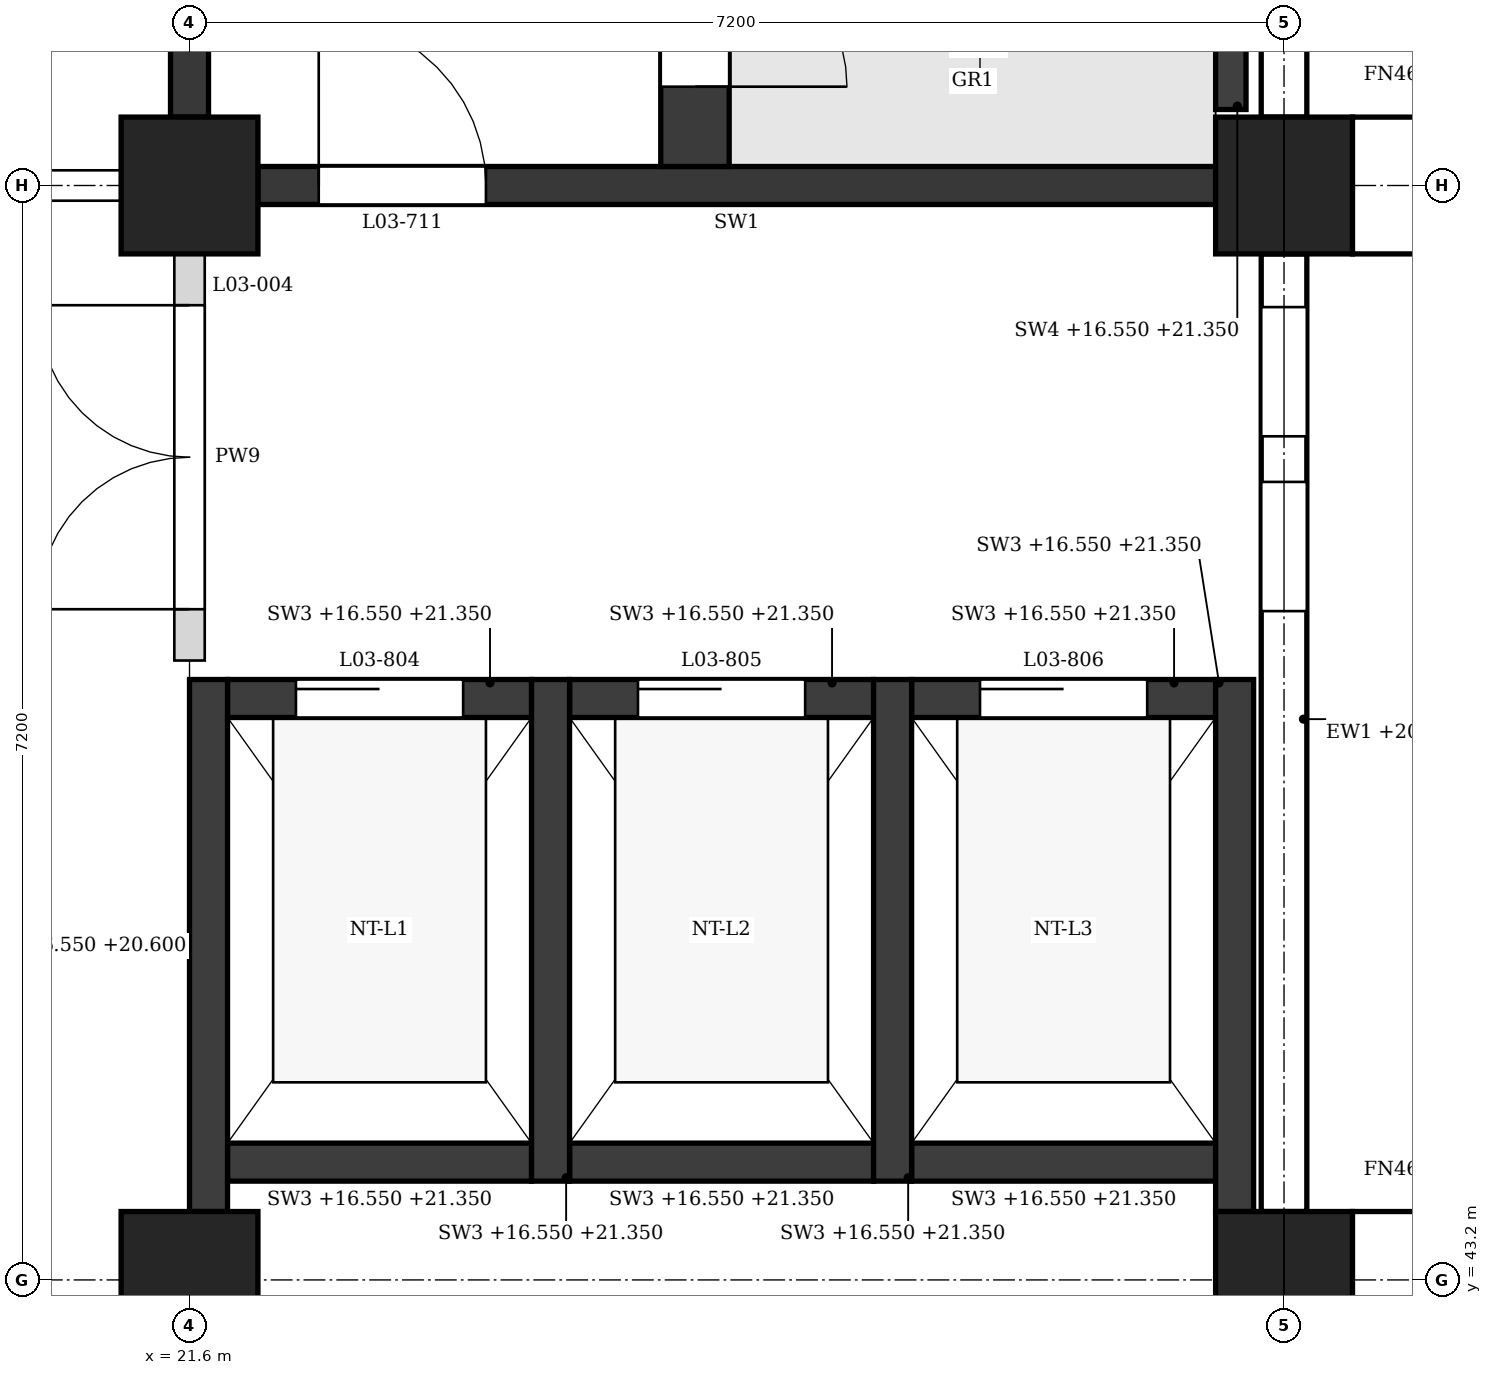
"""IFC4 building model, lengths in metres.
Left out: names, types, materials, properties, quantities, classifications, styles, units other than length and angle.
Written with IfcOpenShell. Run it as: python <this file> out.ifc"""

import sys

from ifc_helpers import new_model, si_unit, direction, frame, frame_2d, origin, origin_2d, place, context, subcontext, project, spatial, polyline, rectangle, outline, extrude, element, fill, save


model = new_model("IFC4")
c1 = context("Model", 3, precision=1e-05, world=origin(), true_north=direction((0.0, 1.0)))
c2 = subcontext(c1, "Body", "Model", "MODEL_VIEW")
j1 = project(units=[si_unit("LENGTHUNIT", "METRE"), si_unit("PLANEANGLEUNIT", "RADIAN")], contexts=[c1])
p1 = place(None, origin())
s1 = spatial("IfcSite", under=j1, at=p1, CompositionType="ELEMENT")
p2 = place(p1, origin())
s2 = spatial("IfcBuilding", under=s1, at=p2, CompositionType="ELEMENT")
p3 = place(p2, frame((0.0, 0.0, 16.8)))
s3 = spatial("IfcBuildingStorey", under=s2, at=p3, CompositionType="ELEMENT", Elevation=16.8)
for number, where, z_axis, x_axis in (
    (1, (21.6, 43.2, 0.0), (0.0, 0.0, 1.0), (1.0, 0.0, 0.0)),
    (2, (21.6, 50.4, 0.0), (0.0, 0.0, 1.0), (1.0, 0.0, 0.0)),
    (3, (28.8, 43.2, 0.0), (0.0, 0.0, 1.0), (1.0, 0.0, 0.0)),
    (4, (28.8, 50.4, 0.0), (0.0, 0.0, 1.0), (1.0, 0.0, 0.0)),
):
    element("IfcColumn", number, at=place(p3, frame(where, z_axis=z_axis, x_axis=x_axis)), inside=s3, PredefinedType="COLUMN", context=c2, shape_type="SweptSolid", body=[
        extrude(rectangle(XDim=0.9, YDim=0.9, at=origin_2d()), origin(), (0.0, 0.0, 1.0), 4.8),
    ])
p4 = place(p3, frame((28.8, 43.65, 0.0), z_axis=(0.0, 0.0, 1.0), x_axis=(0.0, 1.0, 0.0)))
e5 = element("IfcWall", 5, at=p4, inside=s3, PredefinedType="STANDARD", context=c2, shape_type="SweptSolid", body=[
    extrude(rectangle(XDim=6.3, YDim=0.3, at=frame_2d((3.15, 0.0))), origin(), (0.0, 0.0, 1.0), 3.95),
])
p5 = place(p4, frame((3.95, 0.0, 0.9)))
e6 = element("IfcOpeningElement", 6, at=p5, cuts=e5, PredefinedType="OPENING", context=c2, shape_type="SweptSolid", body=[
    extrude(outline(polyline([(0.0, 0.0), (0.85, 0.0), (0.85, 2.05), (0.425, 2.5), (0.0, 2.05), (0.0, 0.0)])), frame((0.0, 0.16, 0.0), z_axis=(0.0, -1.0, 0.0), x_axis=(1.0, 0.0, 0.0)), (0.0, 0.0, 1.0), 0.32),
])
p6 = place(p4, frame((5.1, 0.0, 0.9)))
e7 = element("IfcOpeningElement", 7, at=p6, cuts=e5, PredefinedType="OPENING", context=c2, shape_type="SweptSolid", body=[
    extrude(outline(polyline([(0.0, 0.0), (0.85, 0.0), (0.85, 2.05), (0.425, 2.5), (0.0, 2.05), (0.0, 0.0)])), frame((0.0, 0.16, 0.0), z_axis=(0.0, -1.0, 0.0), x_axis=(1.0, 0.0, 0.0)), (0.0, 0.0, 1.0), 0.32),
])
p7 = place(p3, frame((28.8, 50.85, 0.0), z_axis=(0.0, 0.0, 1.0), x_axis=(0.0, 1.0, 0.0)))
e8 = element("IfcWall", 8, at=p7, inside=s3, PredefinedType="STANDARD", context=c2, shape_type="SweptSolid", body=[
    extrude(rectangle(XDim=6.3, YDim=0.3, at=frame_2d((3.15, 0.0))), origin(), (0.0, 0.0, 1.0), 3.95),
])
p8 = place(p7, frame((0.9, 0.0, 0.9)))
e9 = element("IfcOpeningElement", 9, at=p8, cuts=e8, PredefinedType="OPENING", context=c2, shape_type="SweptSolid", body=[
    extrude(outline(polyline([(0.0, 0.0), (0.9, 0.0), (0.9, 2.05), (0.45, 2.5), (0.0, 2.05), (0.0, 0.0)])), frame((0.0, 0.16, 0.0), z_axis=(0.0, -1.0, 0.0), x_axis=(1.0, 0.0, 0.0)), (0.0, 0.0, 1.0), 0.32),
])
p9 = place(p7, frame((4.5, 0.0, 0.9)))
e10 = element("IfcOpeningElement", 10, at=p9, cuts=e8, PredefinedType="OPENING", context=c2, shape_type="SweptSolid", body=[
    extrude(outline(polyline([(0.0, 0.0), (0.9, 0.0), (0.9, 2.05), (0.45, 2.5), (0.0, 2.05), (0.0, 0.0)])), frame((0.0, 0.16, 0.0), z_axis=(0.0, -1.0, 0.0), x_axis=(1.0, 0.0, 0.0)), (0.0, 0.0, 1.0), 0.32),
])
for number, where, z_axis, x_axis in (
    (11, (29.25, 43.2, 0.0), (0.0, 0.0, 1.0), (1.0, 0.0, 0.0)),
    (12, (29.25, 50.4, 0.0), (0.0, 0.0, 1.0), (1.0, 0.0, 0.0)),
):
    element("IfcWall", number, at=place(p3, frame(where, z_axis=z_axis, x_axis=x_axis)), inside=s3, PredefinedType="POLYGONAL", context=c2, shape_type="SweptSolid", body=[
        extrude(outline(polyline([(1.1, 0.0), (1.1, 4.55), (0.0, 4.55), (0.0, 0.0), (1.1, 0.0)])), frame((0.0, 0.45, 0.0), z_axis=(0.0, -1.0, 0.0), x_axis=(1.0, 0.0, 0.0)), (0.0, 0.0, 1.0), 0.9),
    ])
p10 = place(p3, frame((22.05, 50.4, 0.0), z_axis=(0.0, 0.0, 1.0), x_axis=(1.0, 0.0, 0.0)))
e13 = element("IfcWall", 13, at=p10, inside=s3, PredefinedType="SHEAR", context=c2, shape_type="SweptSolid", body=[
    extrude(rectangle(XDim=6.3, YDim=0.25, at=frame_2d((3.15, 0.0))), origin(), (0.0, 0.0, 1.0), 3.8),
])
p11 = place(p10, frame((0.4, 0.0, 0.0)))
e14 = element("IfcOpeningElement", 14, at=p11, cuts=e13, PredefinedType="OPENING", context=c2, shape_type="SweptSolid", body=[
    extrude(rectangle(XDim=1.1, YDim=2.1, at=frame_2d((0.55, 1.05))), frame((0.0, 0.135, 0.0), z_axis=(0.0, -1.0, 0.0), x_axis=(1.0, 0.0, 0.0)), (0.0, 0.0, 1.0), 0.27),
])
p12 = place(p3, frame((21.6, 50.85, 0.0), z_axis=(0.0, 0.0, 1.0), x_axis=(0.0, 1.0, 0.0)))
e15 = element("IfcWall", 15, at=p12, inside=s3, PredefinedType="SHEAR", context=c2, shape_type="SweptSolid", body=[
    extrude(rectangle(XDim=6.3, YDim=0.25, at=frame_2d((3.15, 0.0))), origin(), (0.0, 0.0, 1.0), 3.8),
])
p13 = place(p3, frame((28.45, 50.9, -0.25), z_axis=(0.0, 0.0, 1.0), x_axis=(0.0, 1.0, 0.0)))
e16 = element("IfcWall", 16, at=p13, inside=s3, PredefinedType="SHEAR", context=c2, shape_type="SweptSolid", body=[
    extrude(rectangle(XDim=0.85, YDim=0.2, at=frame_2d((0.425, 0.0))), origin(), (0.0, 0.0, 1.0), 4.8),
])
p14 = place(p3, frame((24.925, 50.525, 0.0), z_axis=(0.0, 0.0, 1.0), x_axis=(0.0, 1.0, 0.0)))
e17 = element("IfcWall", 17, at=p14, inside=s3, PredefinedType="SHEAR", context=c2, shape_type="SweptSolid", body=[
    extrude(rectangle(XDim=6.85, YDim=0.45, at=frame_2d((3.425, 0.0))), origin(), (0.0, 0.0, 1.0), 4.55),
])
p15 = place(p14, frame((0.525, 0.0, 0.0)))
e18 = element("IfcOpeningElement", 18, at=p15, cuts=e17, PredefinedType="OPENING", context=c2, shape_type="SweptSolid", body=[
    extrude(rectangle(XDim=1.0, YDim=2.1, at=frame_2d((0.5, 1.05))), frame((0.0, 0.235, 0.0), z_axis=(0.0, -1.0, 0.0), x_axis=(1.0, 0.0, 0.0)), (0.0, 0.0, 1.0), 0.47),
])
p16 = place(p3, frame((21.725, 43.65, -0.25), z_axis=(0.0, 0.0, 1.0), x_axis=(0.0, 1.0, 0.0)))
e19 = element("IfcWall", 19, at=p16, inside=s3, PredefinedType="SHEAR", context=c2, shape_type="SweptSolid", body=[
    extrude(rectangle(XDim=3.5, YDim=0.25, at=frame_2d((1.75, 0.0))), origin(), (0.0, 0.0, 1.0), 4.05),
])
for number, where, z_axis, x_axis in (
    (20, (23.975, 43.85, -0.25), (0.0, 0.0, 1.0), (0.0, 1.0, 0.0)),
    (21, (26.225, 43.85, -0.25), (0.0, 0.0, 1.0), (0.0, 1.0, 0.0)),
):
    element("IfcWall", number, at=place(p3, frame(where, z_axis=z_axis, x_axis=x_axis)), inside=s3, PredefinedType="SHEAR", context=c2, shape_type="SweptSolid", body=[
        extrude(rectangle(XDim=3.3, YDim=0.25, at=frame_2d((1.65, 0.0))), origin(), (0.0, 0.0, 1.0), 4.8),
    ])
p17 = place(p3, frame((28.475, 43.65, -0.25), z_axis=(0.0, 0.0, 1.0), x_axis=(0.0, 1.0, 0.0)))
e22 = element("IfcWall", 22, at=p17, inside=s3, PredefinedType="SHEAR", context=c2, shape_type="SweptSolid", body=[
    extrude(rectangle(XDim=3.5, YDim=0.25, at=frame_2d((1.75, 0.0))), origin(), (0.0, 0.0, 1.0), 4.8),
])
p18 = place(p3, frame((21.85, 47.025, -0.25), z_axis=(0.0, 0.0, 1.0), x_axis=(1.0, 0.0, 0.0)))
e23 = element("IfcWall", 23, at=p18, inside=s3, PredefinedType="SHEAR", context=c2, shape_type="SweptSolid", body=[
    extrude(rectangle(XDim=2.0, YDim=0.25, at=frame_2d((1.0, 0.0))), origin(), (0.0, 0.0, 1.0), 4.8),
])
p19 = place(p18, frame((0.45, 0.0, 0.25)))
e24 = element("IfcOpeningElement", 24, at=p19, cuts=e23, PredefinedType="OPENING", context=c2, shape_type="SweptSolid", body=[
    extrude(rectangle(XDim=1.1, YDim=2.1, at=frame_2d((0.55, 1.05))), frame((0.0, 0.135, 0.0), z_axis=(0.0, -1.0, 0.0), x_axis=(1.0, 0.0, 0.0)), (0.0, 0.0, 1.0), 0.27),
])
p20 = place(p3, frame((21.85, 43.975, -0.25), z_axis=(0.0, 0.0, 1.0), x_axis=(1.0, 0.0, 0.0)))
e25 = element("IfcWall", 25, at=p20, inside=s3, PredefinedType="SHEAR", context=c2, shape_type="SweptSolid", body=[
    extrude(rectangle(XDim=2.0, YDim=0.25, at=frame_2d((1.0, 0.0))), origin(), (0.0, 0.0, 1.0), 4.8),
])
p21 = place(p3, frame((24.1, 47.025, -0.25), z_axis=(0.0, 0.0, 1.0), x_axis=(1.0, 0.0, 0.0)))
e26 = element("IfcWall", 26, at=p21, inside=s3, PredefinedType="SHEAR", context=c2, shape_type="SweptSolid", body=[
    extrude(rectangle(XDim=2.0, YDim=0.25, at=frame_2d((1.0, 0.0))), origin(), (0.0, 0.0, 1.0), 4.8),
])
p22 = place(p21, frame((0.45, 0.0, 0.25)))
e27 = element("IfcOpeningElement", 27, at=p22, cuts=e26, PredefinedType="OPENING", context=c2, shape_type="SweptSolid", body=[
    extrude(rectangle(XDim=1.1, YDim=2.1, at=frame_2d((0.55, 1.05))), frame((0.0, 0.135, 0.0), z_axis=(0.0, -1.0, 0.0), x_axis=(1.0, 0.0, 0.0)), (0.0, 0.0, 1.0), 0.27),
])
p23 = place(p3, frame((24.1, 43.975, -0.25), z_axis=(0.0, 0.0, 1.0), x_axis=(1.0, 0.0, 0.0)))
e28 = element("IfcWall", 28, at=p23, inside=s3, PredefinedType="SHEAR", context=c2, shape_type="SweptSolid", body=[
    extrude(rectangle(XDim=2.0, YDim=0.25, at=frame_2d((1.0, 0.0))), origin(), (0.0, 0.0, 1.0), 4.8),
])
p24 = place(p3, frame((26.35, 47.025, -0.25), z_axis=(0.0, 0.0, 1.0), x_axis=(1.0, 0.0, 0.0)))
e29 = element("IfcWall", 29, at=p24, inside=s3, PredefinedType="SHEAR", context=c2, shape_type="SweptSolid", body=[
    extrude(rectangle(XDim=2.0, YDim=0.25, at=frame_2d((1.0, 0.0))), origin(), (0.0, 0.0, 1.0), 4.8),
])
p25 = place(p24, frame((0.45, 0.0, 0.25)))
e30 = element("IfcOpeningElement", 30, at=p25, cuts=e29, PredefinedType="OPENING", context=c2, shape_type="SweptSolid", body=[
    extrude(rectangle(XDim=1.1, YDim=2.1, at=frame_2d((0.55, 1.05))), frame((0.0, 0.135, 0.0), z_axis=(0.0, -1.0, 0.0), x_axis=(1.0, 0.0, 0.0)), (0.0, 0.0, 1.0), 0.27),
])
p26 = place(p3, frame((26.35, 43.975, -0.25), z_axis=(0.0, 0.0, 1.0), x_axis=(1.0, 0.0, 0.0)))
e31 = element("IfcWall", 31, at=p26, inside=s3, PredefinedType="SHEAR", context=c2, shape_type="SweptSolid", body=[
    extrude(rectangle(XDim=2.0, YDim=0.25, at=frame_2d((1.0, 0.0))), origin(), (0.0, 0.0, 1.0), 4.8),
])
p27 = place(p3, frame((14.85, 50.4, 0.0), z_axis=(0.0, 0.0, 1.0), x_axis=(1.0, 0.0, 0.0)))
e32 = element("IfcWall", 32, at=p27, inside=s3, PredefinedType="PARTITIONING", context=c2, shape_type="SweptSolid", body=[
    extrude(rectangle(XDim=6.3, YDim=0.2, at=frame_2d((3.15, 0.0))), origin(), (0.0, 0.0, 1.0), 3.8),
])
p28 = place(p27, frame((4.225, 0.0, 0.0)))
e33 = element("IfcOpeningElement", 33, at=p28, cuts=e32, PredefinedType="OPENING", context=c2, shape_type="SweptSolid", body=[
    extrude(rectangle(XDim=1.0, YDim=2.1, at=frame_2d((0.5, 1.05))), frame((0.0, 0.11, 0.0), z_axis=(0.0, -1.0, 0.0), x_axis=(1.0, 0.0, 0.0)), (0.0, 0.0, 1.0), 0.22),
])
p29 = place(p3, frame((21.6, 47.275, 0.0), z_axis=(0.0, 0.0, 1.0), x_axis=(0.0, 1.0, 0.0)))
e34 = element("IfcWall", 34, at=p29, inside=s3, PredefinedType="PARTITIONING", context=c2, shape_type="SweptSolid", body=[
    extrude(rectangle(XDim=2.675, YDim=0.2, at=frame_2d((1.337, 0.0))), origin(), (0.0, 0.0, 1.0), 3.8),
])
p30 = place(p29, frame((0.337, 0.0, 0.0)))
e35 = element("IfcOpeningElement", 35, at=p30, cuts=e34, PredefinedType="OPENING", context=c2, shape_type="SweptSolid", body=[
    extrude(rectangle(XDim=2.0, YDim=2.4, at=frame_2d((1.0, 1.2))), frame((0.0, 0.11, 0.0), z_axis=(0.0, -1.0, 0.0), x_axis=(1.0, 0.0, 0.0)), (0.0, 0.0, 1.0), 0.22),
])
p31 = place(p5, origin())
e36 = element("IfcWindow", 36, at=p31, inside=s3, PartitioningType="SINGLE_PANEL", PredefinedType="WINDOW", context=c2, shape_type="SweptSolid", body=[
    extrude(outline(polyline([(0.0, 0.0), (0.85, 0.0), (0.85, 2.05), (0.425, 2.5), (0.0, 2.05), (0.0, 0.0)])), frame((0.0, 0.03, 0.0), z_axis=(0.0, -1.0, 0.0), x_axis=(1.0, 0.0, 0.0)), (0.0, 0.0, 1.0), 0.06),
])
fill(e6, e36)
p32 = place(p6, origin())
e37 = element("IfcWindow", 37, at=p32, inside=s3, PartitioningType="SINGLE_PANEL", PredefinedType="WINDOW", context=c2, shape_type="SweptSolid", body=[
    extrude(outline(polyline([(0.0, 0.0), (0.85, 0.0), (0.85, 2.05), (0.425, 2.5), (0.0, 2.05), (0.0, 0.0)])), frame((0.0, 0.03, 0.0), z_axis=(0.0, -1.0, 0.0), x_axis=(1.0, 0.0, 0.0)), (0.0, 0.0, 1.0), 0.06),
])
fill(e7, e37)
p33 = place(p15, frame((1.0, 0.0, 0.0), z_axis=(0.0, 0.0, 1.0), x_axis=(-1.0, 0.0, 0.0)))
e38 = element("IfcDoor", 38, at=p33, inside=s3, OperationType="SINGLE_SWING_RIGHT", PredefinedType="DOOR", context=c2, shape_type="SweptSolid", body=[
    extrude(rectangle(XDim=1.0, YDim=2.1, at=frame_2d((0.5, 1.05))), frame((0.0, 0.025, 0.0), z_axis=(0.0, -1.0, 0.0), x_axis=(1.0, 0.0, 0.0)), (0.0, 0.0, 1.0), 0.05),
])
fill(e18, e38)
p34 = place(p11, origin())
e39 = element("IfcDoor", 39, at=p34, inside=s3, OperationType="SINGLE_SWING_LEFT", PredefinedType="DOOR", context=c2, shape_type="SweptSolid", body=[
    extrude(rectangle(XDim=1.1, YDim=2.1, at=frame_2d((0.55, 1.05))), frame((0.0, 0.025, 0.0), z_axis=(0.0, -1.0, 0.0), x_axis=(1.0, 0.0, 0.0)), (0.0, 0.0, 1.0), 0.05),
])
fill(e14, e39)
p35 = place(p19, origin())
e40 = element("IfcDoor", 40, at=p35, inside=s3, OperationType="SLIDING_TO_LEFT", PredefinedType="DOOR", context=c2, shape_type="SweptSolid", body=[
    extrude(rectangle(XDim=1.1, YDim=2.1, at=frame_2d((0.55, 1.05))), frame((0.0, 0.025, 0.0), z_axis=(0.0, -1.0, 0.0), x_axis=(1.0, 0.0, 0.0)), (0.0, 0.0, 1.0), 0.05),
])
fill(e24, e40)
p36 = place(p22, origin())
e41 = element("IfcDoor", 41, at=p36, inside=s3, OperationType="SLIDING_TO_LEFT", PredefinedType="DOOR", context=c2, shape_type="SweptSolid", body=[
    extrude(rectangle(XDim=1.1, YDim=2.1, at=frame_2d((0.55, 1.05))), frame((0.0, 0.025, 0.0), z_axis=(0.0, -1.0, 0.0), x_axis=(1.0, 0.0, 0.0)), (0.0, 0.0, 1.0), 0.05),
])
fill(e27, e41)
p37 = place(p25, origin())
e42 = element("IfcDoor", 42, at=p37, inside=s3, OperationType="SLIDING_TO_LEFT", PredefinedType="DOOR", context=c2, shape_type="SweptSolid", body=[
    extrude(rectangle(XDim=1.1, YDim=2.1, at=frame_2d((0.55, 1.05))), frame((0.0, 0.025, 0.0), z_axis=(0.0, -1.0, 0.0), x_axis=(1.0, 0.0, 0.0)), (0.0, 0.0, 1.0), 0.05),
])
fill(e30, e42)
p38 = place(p30, origin())
e43 = element("IfcDoor", 43, at=p38, inside=s3, OperationType="DOUBLE_DOOR_SINGLE_SWING", PredefinedType="DOOR", context=c2, shape_type="SweptSolid", body=[
    extrude(rectangle(XDim=2.0, YDim=2.4, at=frame_2d((1.0, 1.2))), frame((0.0, 0.025, 0.0), z_axis=(0.0, -1.0, 0.0), x_axis=(1.0, 0.0, 0.0)), (0.0, 0.0, 1.0), 0.05),
])
fill(e35, e43)
save(model, sys.argv[1])
